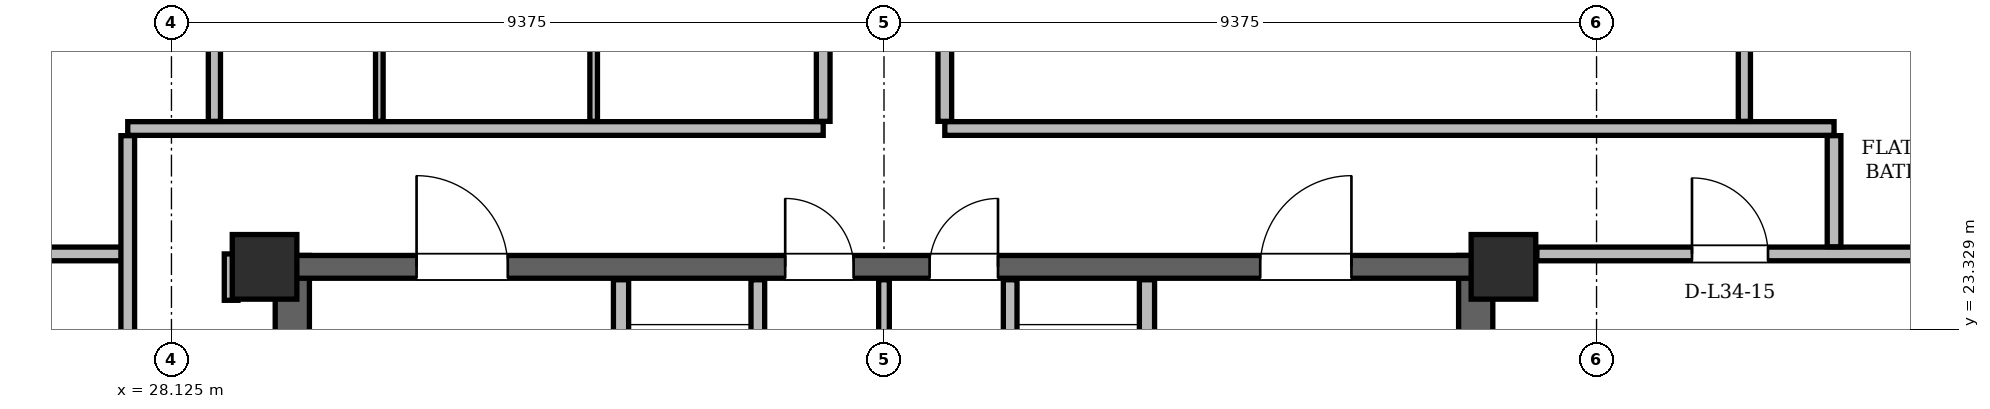
"""IFC4 building model, lengths in metres.
Left out: names, types, materials, properties, quantities, classifications, styles, units other than length and angle.
Written with IfcOpenShell. Run it as: python <this file> out.ifc"""

import sys

from ifc_helpers import new_model, si_unit, direction, frame, frame_2d, origin, origin_2d, place, context, subcontext, project, spatial, rectangle, hollow_rectangle, extrude, element, fill, save


model = new_model("IFC4")
c1 = context("Model", 3, precision=1e-05, world=origin(), true_north=direction((0.0, 1.0)))
c2 = subcontext(c1, "Body", "Model", "MODEL_VIEW")
j1 = project(units=[si_unit("LENGTHUNIT", "METRE"), si_unit("PLANEANGLEUNIT", "RADIAN")], contexts=[c1])
p1 = place(None, origin())
s1 = spatial("IfcSite", under=j1, at=p1, CompositionType="ELEMENT")
p2 = place(p1, origin())
s2 = spatial("IfcBuilding", under=s1, at=p2, CompositionType="ELEMENT")
p3 = place(p2, frame((0.0, 0.0, 130.2)))
s3 = spatial("IfcBuildingStorey", under=s2, at=p3, CompositionType="ELEMENT", Elevation=130.2)
for number, where, z_axis, x_axis in (
    (1, (45.65, 24.15, 0.0), (0.0, 0.0, 1.0), (1.0, 0.0, 0.0)),
    (2, (29.35, 24.15, 0.0), (0.0, 0.0, 1.0), (1.0, 0.0, 0.0)),
):
    element("IfcColumn", number, at=place(p3, frame(where, z_axis=z_axis, x_axis=x_axis)), inside=s3, PredefinedType="COLUMN", context=c2, shape_type="SweptSolid", body=[
        extrude(hollow_rectangle(XDim=0.85, YDim=0.85, WallThickness=0.07, at=origin_2d()), origin(), (0.0, 0.0, 1.0), 3.6),
    ])
for number, where, z_axis, x_axis in (
    (3, (29.715, 11.0, 0.0), (0.0, 0.0, 1.0), (0.0, 1.0, 0.0)),
    (4, (45.285, 11.0, 0.0), (0.0, 0.0, 1.0), (0.0, 1.0, 0.0)),
):
    element("IfcWall", number, at=place(p3, frame(where, z_axis=z_axis, x_axis=x_axis)), inside=s3, PredefinedType="SHEAR", context=c2, shape_type="SweptSolid", body=[
        extrude(rectangle(XDim=13.3, YDim=0.45, at=frame_2d((6.65, 0.0))), origin(), (0.0, 0.0, 1.0), 3.34),
    ])
p4 = place(p3, frame((29.65, 24.15, 0.0), z_axis=(0.0, 0.0, 1.0), x_axis=(1.0, 0.0, 0.0)))
e5 = element("IfcWall", 5, at=p4, inside=s3, PredefinedType="SHEAR", context=c2, shape_type="SweptSolid", body=[
    extrude(rectangle(XDim=15.7, YDim=0.3, at=frame_2d((7.85, 0.0))), origin(), (0.0, 0.0, 1.0), 3.34),
])
p5 = place(p4, frame((1.7, 0.0, 0.0)))
e6 = element("IfcOpeningElement", 6, at=p5, cuts=e5, PredefinedType="OPENING", context=c2, shape_type="SweptSolid", body=[
    extrude(rectangle(XDim=1.2, YDim=2.2, at=frame_2d((0.6, 1.1))), frame((0.0, 0.15, 0.0), z_axis=(0.0, -1.0, 0.0), x_axis=(1.0, 0.0, 0.0)), (0.0, 0.0, 1.0), 0.3),
])
p6 = place(p4, frame((12.8, 0.0, 0.0)))
e7 = element("IfcOpeningElement", 7, at=p6, cuts=e5, PredefinedType="OPENING", context=c2, shape_type="SweptSolid", body=[
    extrude(rectangle(XDim=1.2, YDim=2.2, at=frame_2d((0.6, 1.1))), frame((0.0, 0.15, 0.0), z_axis=(0.0, -1.0, 0.0), x_axis=(1.0, 0.0, 0.0)), (0.0, 0.0, 1.0), 0.3),
])
p7 = place(p4, frame((6.55, 0.0, 0.0)))
e8 = element("IfcOpeningElement", 8, at=p7, cuts=e5, PredefinedType="OPENING", context=c2, shape_type="SweptSolid", body=[
    extrude(rectangle(XDim=0.9, YDim=2.05, at=frame_2d((0.45, 1.025))), frame((0.0, 0.15, 0.0), z_axis=(0.0, -1.0, 0.0), x_axis=(1.0, 0.0, 0.0)), (0.0, 0.0, 1.0), 0.3),
])
p8 = place(p4, frame((8.45, 0.0, 0.0)))
e9 = element("IfcOpeningElement", 9, at=p8, cuts=e5, PredefinedType="OPENING", context=c2, shape_type="SweptSolid", body=[
    extrude(rectangle(XDim=0.9, YDim=2.05, at=frame_2d((0.45, 1.025))), frame((0.0, 0.15, 0.0), z_axis=(0.0, -1.0, 0.0), x_axis=(1.0, 0.0, 0.0)), (0.0, 0.0, 1.0), 0.3),
])
p9 = place(p3, frame((60.258, 12.962, 0.0), z_axis=(0.0, 0.0, 1.0), x_axis=(-0.499999044439, 0.866025955477, 0.0)))
e10 = element("IfcWall", 10, at=p9, inside=s3, PredefinedType="SOLIDWALL", context=c2, shape_type="SweptSolid", body=[
    extrude(rectangle(XDim=35.122, YDim=0.34, at=frame_2d((17.561, 0.0))), origin(), (0.0, 0.0, 1.0), 2.558),
])
p10 = place(p9, frame((8.034, 0.0, 0.0)))
e11 = element("IfcOpeningElement", 11, at=p10, cuts=e10, PredefinedType="OPENING", context=c2, shape_type="SweptSolid", body=[
    extrude(rectangle(XDim=1.5, YDim=2.2, at=frame_2d((0.75, 1.1))), frame((0.0, 0.17, 0.0), z_axis=(0.0, -1.0, 0.0), x_axis=(1.0, 0.0, 0.0)), (0.0, 0.0, 1.0), 0.34),
])
p11 = place(p9, frame((27.042, 0.0, 0.0)))
e12 = element("IfcOpeningElement", 12, at=p11, cuts=e10, PredefinedType="OPENING", context=c2, shape_type="SweptSolid", body=[
    extrude(rectangle(XDim=1.5, YDim=2.2, at=frame_2d((0.75, 1.1))), frame((0.0, 0.17, 0.0), z_axis=(0.0, -1.0, 0.0), x_axis=(1.0, 0.0, 0.0)), (0.0, 0.0, 1.0), 0.34),
])
p12 = place(p9, frame((3.327, 0.0, 0.85)))
e13 = element("IfcOpeningElement", 13, at=p12, cuts=e10, PredefinedType="OPENING", context=c2, shape_type="SweptSolid", body=[
    extrude(rectangle(XDim=1.2, YDim=1.48, at=frame_2d((0.6, 0.74))), frame((0.0, 0.17, 0.0), z_axis=(0.0, -1.0, 0.0), x_axis=(1.0, 0.0, 0.0)), (0.0, 0.0, 1.0), 0.34),
])
p13 = place(p9, frame((11.544, 0.0, 0.85)))
e14 = element("IfcOpeningElement", 14, at=p13, cuts=e10, PredefinedType="OPENING", context=c2, shape_type="SweptSolid", body=[
    extrude(rectangle(XDim=1.2, YDim=1.48, at=frame_2d((0.6, 0.74))), frame((0.0, 0.17, 0.0), z_axis=(0.0, -1.0, 0.0), x_axis=(1.0, 0.0, 0.0)), (0.0, 0.0, 1.0), 0.34),
])
p14 = place(p9, frame((31.202, 0.0, 0.85)))
e15 = element("IfcOpeningElement", 15, at=p14, cuts=e10, PredefinedType="OPENING", context=c2, shape_type="SweptSolid", body=[
    extrude(rectangle(XDim=2.2, YDim=1.598, at=frame_2d((1.1, 0.799))), frame((0.0, 0.17, 0.0), z_axis=(0.0, -1.0, 0.0), x_axis=(1.0, 0.0, 0.0)), (0.0, 0.0, 1.0), 0.34),
])
p15 = place(p9, frame((14.277, 0.0, 0.85)))
e16 = element("IfcOpeningElement", 16, at=p15, cuts=e10, PredefinedType="OPENING", context=c2, shape_type="SweptSolid", body=[
    extrude(rectangle(XDim=2.6, YDim=1.598, at=frame_2d((1.3, 0.799))), frame((0.0, 0.17, 0.0), z_axis=(0.0, -1.0, 0.0), x_axis=(1.0, 0.0, 0.0)), (0.0, 0.0, 1.0), 0.34),
])
p16 = place(p9, frame((19.025, 0.0, 0.85)))
e17 = element("IfcOpeningElement", 17, at=p16, cuts=e10, PredefinedType="OPENING", context=c2, shape_type="SweptSolid", body=[
    extrude(rectangle(XDim=2.0, YDim=1.598, at=frame_2d((1.0, 0.799))), frame((0.0, 0.17, 0.0), z_axis=(0.0, -1.0, 0.0), x_axis=(1.0, 0.0, 0.0)), (0.0, 0.0, 1.0), 0.34),
])
p17 = place(p3, frame((32.303, 43.378, 0.0), z_axis=(0.0, 0.0, 1.0), x_axis=(-0.499999044439, -0.866025955477, 0.0)))
e18 = element("IfcWall", 18, at=p17, inside=s3, PredefinedType="SOLIDWALL", context=c2, shape_type="SweptSolid", body=[
    extrude(rectangle(XDim=35.122, YDim=0.34, at=frame_2d((17.561, 0.0))), origin(), (0.0, 0.0, 1.0), 2.558),
])
p18 = place(p17, frame((8.034, 0.0, 0.0)))
e19 = element("IfcOpeningElement", 19, at=p18, cuts=e18, PredefinedType="OPENING", context=c2, shape_type="SweptSolid", body=[
    extrude(rectangle(XDim=1.5, YDim=2.2, at=frame_2d((0.75, 1.1))), frame((0.0, 0.17, 0.0), z_axis=(0.0, -1.0, 0.0), x_axis=(1.0, 0.0, 0.0)), (0.0, 0.0, 1.0), 0.34),
])
p19 = place(p17, frame((26.832, 0.0, 0.0)))
e20 = element("IfcOpeningElement", 20, at=p19, cuts=e18, PredefinedType="OPENING", context=c2, shape_type="SweptSolid", body=[
    extrude(rectangle(XDim=1.5, YDim=2.2, at=frame_2d((0.75, 1.1))), frame((0.0, 0.17, 0.0), z_axis=(0.0, -1.0, 0.0), x_axis=(1.0, 0.0, 0.0)), (0.0, 0.0, 1.0), 0.34),
])
p20 = place(p17, frame((32.666, 0.0, 0.85)))
e21 = element("IfcOpeningElement", 21, at=p20, cuts=e18, PredefinedType="OPENING", context=c2, shape_type="SweptSolid", body=[
    extrude(rectangle(XDim=1.4, YDim=1.598, at=frame_2d((0.7, 0.799))), frame((0.0, 0.17, 0.0), z_axis=(0.0, -1.0, 0.0), x_axis=(1.0, 0.0, 0.0)), (0.0, 0.0, 1.0), 0.34),
])
p21 = place(p17, frame((22.593, 0.0, 0.85)))
e22 = element("IfcOpeningElement", 22, at=p21, cuts=e18, PredefinedType="OPENING", context=c2, shape_type="SweptSolid", body=[
    extrude(rectangle(XDim=1.2, YDim=1.48, at=frame_2d((0.6, 0.74))), frame((0.0, 0.17, 0.0), z_axis=(0.0, -1.0, 0.0), x_axis=(1.0, 0.0, 0.0)), (0.0, 0.0, 1.0), 0.34),
])
p22 = place(p17, frame((2.413, 0.0, 0.85)))
e23 = element("IfcOpeningElement", 23, at=p22, cuts=e18, PredefinedType="OPENING", context=c2, shape_type="SweptSolid", body=[
    extrude(rectangle(XDim=1.4, YDim=1.598, at=frame_2d((0.7, 0.799))), frame((0.0, 0.17, 0.0), z_axis=(0.0, -1.0, 0.0), x_axis=(1.0, 0.0, 0.0)), (0.0, 0.0, 1.0), 0.34),
])
p23 = place(p17, frame((13.476, 0.0, 0.85)))
e24 = element("IfcOpeningElement", 24, at=p23, cuts=e18, PredefinedType="OPENING", context=c2, shape_type="SweptSolid", body=[
    extrude(rectangle(XDim=2.5, YDim=1.598, at=frame_2d((1.25, 0.799))), frame((0.0, 0.17, 0.0), z_axis=(0.0, -1.0, 0.0), x_axis=(1.0, 0.0, 0.0)), (0.0, 0.0, 1.0), 0.34),
])
p24 = place(p17, frame((18.259, 0.0, 0.85)))
e25 = element("IfcOpeningElement", 25, at=p24, cuts=e18, PredefinedType="OPENING", context=c2, shape_type="SweptSolid", body=[
    extrude(rectangle(XDim=1.2, YDim=1.48, at=frame_2d((0.6, 0.74))), frame((0.0, 0.17, 0.0), z_axis=(0.0, -1.0, 0.0), x_axis=(1.0, 0.0, 0.0)), (0.0, 0.0, 1.0), 0.34),
])
p25 = place(p17, frame((20.455, 0.0, 0.85)))
e26 = element("IfcOpeningElement", 26, at=p25, cuts=e18, PredefinedType="OPENING", context=c2, shape_type="SweptSolid", body=[
    extrude(rectangle(XDim=1.2, YDim=1.48, at=frame_2d((0.6, 0.74))), frame((0.0, 0.17, 0.0), z_axis=(0.0, -1.0, 0.0), x_axis=(1.0, 0.0, 0.0)), (0.0, 0.0, 1.0), 0.34),
])
p26 = place(p3, frame((34.04, 19.48, 0.0), z_axis=(0.0, 0.0, 1.0), x_axis=(0.0, 1.0, 0.0)))
e27 = element("IfcWall", 27, at=p26, inside=s3, PredefinedType="PARTITIONING", context=c2, shape_type="SweptSolid", body=[
    extrude(rectangle(XDim=4.5, YDim=0.2, at=frame_2d((2.25, 0.0))), origin(), (0.0, 0.0, 1.0), 2.38),
])
p27 = place(p26, frame((2.12, 0.0, 0.0)))
e28 = element("IfcOpeningElement", 28, at=p27, cuts=e27, PredefinedType="OPENING", context=c2, shape_type="SweptSolid", body=[
    extrude(rectangle(XDim=1.1, YDim=2.2, at=frame_2d((0.55, 1.1))), frame((0.0, 0.1, 0.0), z_axis=(0.0, -1.0, 0.0), x_axis=(1.0, 0.0, 0.0)), (0.0, 0.0, 1.0), 0.2),
])
p28 = place(p3, frame((35.84, 20.96, 0.0), z_axis=(0.0, 0.0, 1.0), x_axis=(0.0, 1.0, 0.0)))
e29 = element("IfcWall", 29, at=p28, inside=s3, PredefinedType="PARTITIONING", context=c2, shape_type="SweptSolid", body=[
    extrude(rectangle(XDim=3.02, YDim=0.18, at=frame_2d((1.51, 0.0))), origin(), (0.0, 0.0, 1.0), 2.38),
])
p29 = place(p3, frame((40.96, 19.48, 0.0), z_axis=(0.0, 0.0, 1.0), x_axis=(0.0, 1.0, 0.0)))
e30 = element("IfcWall", 30, at=p29, inside=s3, PredefinedType="PARTITIONING", context=c2, shape_type="SweptSolid", body=[
    extrude(rectangle(XDim=4.5, YDim=0.2, at=frame_2d((2.25, 0.0))), origin(), (0.0, 0.0, 1.0), 2.38),
])
p30 = place(p29, frame((2.12, 0.0, 0.0)))
e31 = element("IfcOpeningElement", 31, at=p30, cuts=e30, PredefinedType="OPENING", context=c2, shape_type="SweptSolid", body=[
    extrude(rectangle(XDim=1.1, YDim=2.2, at=frame_2d((0.55, 1.1))), frame((0.0, 0.1, 0.0), z_axis=(0.0, -1.0, 0.0), x_axis=(1.0, 0.0, 0.0)), (0.0, 0.0, 1.0), 0.2),
])
p31 = place(p3, frame((39.16, 20.96, 0.0), z_axis=(0.0, 0.0, 1.0), x_axis=(0.0, 1.0, 0.0)))
e32 = element("IfcWall", 32, at=p31, inside=s3, PredefinedType="PARTITIONING", context=c2, shape_type="SweptSolid", body=[
    extrude(rectangle(XDim=3.02, YDim=0.18, at=frame_2d((1.51, 0.0))), origin(), (0.0, 0.0, 1.0), 2.38),
])
p32 = place(p3, frame((37.5, 21.06, 0.0), z_axis=(0.0, 0.0, 1.0), x_axis=(0.0, 1.0, 0.0)))
e33 = element("IfcWall", 33, at=p32, inside=s3, PredefinedType="PARTITIONING", context=c2, shape_type="SweptSolid", body=[
    extrude(rectangle(XDim=2.92, YDim=0.14, at=frame_2d((1.46, 0.0))), origin(), (0.0, 0.0, 1.0), 2.38),
])
p33 = place(p3, frame((21.5, 24.32, 0.0), z_axis=(0.0, 0.0, 1.0), x_axis=(1.0, 0.0, 0.0)))
e34 = element("IfcWall", 34, at=p33, inside=s3, PredefinedType="PARTITIONING", context=c2, shape_type="SweptSolid", body=[
    extrude(rectangle(XDim=6.11, YDim=0.18, at=frame_2d((3.055, 0.0))), origin(), (0.0, 0.0, 1.0), 3.34),
])
p34 = place(p3, frame((46.09, 24.32, 0.0), z_axis=(0.0, 0.0, 1.0), x_axis=(1.0, 0.0, 0.0)))
e35 = element("IfcWall", 35, at=p34, inside=s3, PredefinedType="PARTITIONING", context=c2, shape_type="SweptSolid", body=[
    extrude(rectangle(XDim=7.409, YDim=0.18, at=frame_2d((3.705, 0.0))), origin(), (0.0, 0.0, 1.0), 3.34),
])
p35 = place(p34, frame((2.041, 0.0, 0.0)))
e36 = element("IfcOpeningElement", 36, at=p35, cuts=e35, PredefinedType="OPENING", context=c2, shape_type="SweptSolid", body=[
    extrude(rectangle(XDim=1.0, YDim=2.18, at=frame_2d((0.5, 1.09))), frame((0.0, 0.09, 0.0), z_axis=(0.0, -1.0, 0.0), x_axis=(1.0, 0.0, 0.0)), (0.0, 0.0, 1.0), 0.18),
])
p36 = place(p3, frame((27.55, 25.97, 0.0), z_axis=(0.0, 0.0, 1.0), x_axis=(1.0, 0.0, 0.0)))
e37 = element("IfcWall", 37, at=p36, inside=s3, PredefinedType="PARTITIONING", context=c2, shape_type="SweptSolid", body=[
    extrude(rectangle(XDim=9.15, YDim=0.18, at=frame_2d((4.575, 0.0))), origin(), (0.0, 0.0, 1.0), 2.794),
])
p37 = place(p3, frame((38.3, 25.97, 0.0), z_axis=(0.0, 0.0, 1.0), x_axis=(1.0, 0.0, 0.0)))
e38 = element("IfcWall", 38, at=p37, inside=s3, PredefinedType="PARTITIONING", context=c2, shape_type="SweptSolid", body=[
    extrude(rectangle(XDim=11.7, YDim=0.18, at=frame_2d((5.85, 0.0))), origin(), (0.0, 0.0, 1.0), 2.794),
])
p38 = place(p3, frame((27.55, 18.544, 0.0), z_axis=(0.0, 0.0, 1.0), x_axis=(0.0, 1.0, 0.0)))
e39 = element("IfcWall", 39, at=p38, inside=s3, PredefinedType="PARTITIONING", context=c2, shape_type="SweptSolid", body=[
    extrude(rectangle(XDim=7.332, YDim=0.18, at=frame_2d((3.666, 0.0))), origin(), (0.0, 0.0, 1.0), 3.34),
])
p39 = place(p3, frame((28.69, 26.064, 0.0), z_axis=(0.0, 0.0, 1.0), x_axis=(0.0, 1.0, 0.0)))
e40 = element("IfcWall", 40, at=p39, inside=s3, PredefinedType="PARTITIONING", context=c2, shape_type="SweptSolid", body=[
    extrude(rectangle(XDim=1.542, YDim=0.16, at=frame_2d((0.771, 0.0))), origin(), (0.0, 0.0, 1.0), 3.34),
])
p40 = place(p3, frame((28.91, 23.71, 0.0), z_axis=(0.0, 0.0, 1.0), x_axis=(0.0, 1.0, 0.0)))
e41 = element("IfcWall", 41, at=p40, inside=s3, PredefinedType="PARTITIONING", context=c2, shape_type="SweptSolid", body=[
    extrude(rectangle(XDim=0.61, YDim=0.18, at=frame_2d((0.305, 0.0))), origin(), (0.0, 0.0, 1.0), 3.34),
])
for number, where, z_axis, x_axis in (
    (42, (30.86, 26.064, 0.0), (0.0, 0.0, 1.0), (0.0, 1.0, 0.0)),
    (43, (33.68, 26.064, 0.0), (0.0, 0.0, 1.0), (0.0, 1.0, 0.0)),
):
    element("IfcWall", number, at=place(p3, frame(where, z_axis=z_axis, x_axis=x_axis)), inside=s3, PredefinedType="PARTITIONING", context=c2, shape_type="SweptSolid", body=[
        extrude(rectangle(XDim=1.542, YDim=0.1, at=frame_2d((0.771, 0.0))), origin(), (0.0, 0.0, 1.0), 3.34),
    ])
p41 = place(p3, frame((36.7, 26.064, 0.0), z_axis=(0.0, 0.0, 1.0), x_axis=(0.0, 1.0, 0.0)))
e44 = element("IfcWall", 44, at=p41, inside=s3, PredefinedType="PARTITIONING", context=c2, shape_type="SweptSolid", body=[
    extrude(rectangle(XDim=17.14, YDim=0.18, at=frame_2d((8.57, 0.0))), origin(), (0.0, 0.0, 1.0), 3.34),
])
p42 = place(p41, frame((7.06, 0.0, 0.0)))
e45 = element("IfcOpeningElement", 45, at=p42, cuts=e44, PredefinedType="OPENING", context=c2, shape_type="SweptSolid", body=[
    extrude(rectangle(XDim=1.0, YDim=2.18, at=frame_2d((0.5, 1.09))), frame((0.0, 0.09, 0.0), z_axis=(0.0, -1.0, 0.0), x_axis=(1.0, 0.0, 0.0)), (0.0, 0.0, 1.0), 0.18),
])
p43 = place(p3, frame((38.3, 26.064, 0.0), z_axis=(0.0, 0.0, 1.0), x_axis=(0.0, 1.0, 0.0)))
e46 = element("IfcWall", 46, at=p43, inside=s3, PredefinedType="PARTITIONING", context=c2, shape_type="SweptSolid", body=[
    extrude(rectangle(XDim=13.442, YDim=0.18, at=frame_2d((6.721, 0.0))), origin(), (0.0, 0.0, 1.0), 3.34),
])
p44 = place(p43, frame((6.146, 0.0, 0.0)))
e47 = element("IfcOpeningElement", 47, at=p44, cuts=e46, PredefinedType="OPENING", context=c2, shape_type="SweptSolid", body=[
    extrude(rectangle(XDim=1.0, YDim=2.18, at=frame_2d((0.5, 1.09))), frame((0.0, 0.09, 0.0), z_axis=(0.0, -1.0, 0.0), x_axis=(1.0, 0.0, 0.0)), (0.0, 0.0, 1.0), 0.18),
])
p45 = place(p3, frame((48.82, 26.064, 0.0), z_axis=(0.0, 0.0, 1.0), x_axis=(0.0, 1.0, 0.0)))
e48 = element("IfcWall", 48, at=p45, inside=s3, PredefinedType="PARTITIONING", context=c2, shape_type="SweptSolid", body=[
    extrude(rectangle(XDim=6.361, YDim=0.16, at=frame_2d((3.181, 0.0))), origin(), (0.0, 0.0, 1.0), 2.558),
])
p46 = place(p45, frame((2.724, 0.0, 0.0)))
e49 = element("IfcOpeningElement", 49, at=p46, cuts=e48, PredefinedType="OPENING", context=c2, shape_type="SweptSolid", body=[
    extrude(rectangle(XDim=0.88, YDim=2.08, at=frame_2d((0.44, 1.04))), frame((0.0, 0.08, 0.0), z_axis=(0.0, -1.0, 0.0), x_axis=(1.0, 0.0, 0.0)), (0.0, 0.0, 1.0), 0.16),
])
p47 = place(p3, frame((50.0, 24.414, 0.0), z_axis=(0.0, 0.0, 1.0), x_axis=(0.0, 1.0, 0.0)))
e50 = element("IfcWall", 50, at=p47, inside=s3, PredefinedType="PARTITIONING", context=c2, shape_type="SweptSolid", body=[
    extrude(rectangle(XDim=1.462, YDim=0.18, at=frame_2d((0.731, 0.0))), origin(), (0.0, 0.0, 1.0), 3.34),
])
p48 = place(p5, origin())
e51 = element("IfcDoor", 51, at=p48, inside=s3, OperationType="SINGLE_SWING_LEFT", PredefinedType="DOOR", context=c2, shape_type="SweptSolid", body=[
    extrude(rectangle(XDim=1.2, YDim=2.2, at=frame_2d((0.6, 1.1))), frame((0.0, 0.025, 0.0), z_axis=(0.0, -1.0, 0.0), x_axis=(1.0, 0.0, 0.0)), (0.0, 0.0, 1.0), 0.05),
])
fill(e6, e51)
p49 = place(p6, origin())
e52 = element("IfcDoor", 52, at=p49, inside=s3, OperationType="SINGLE_SWING_RIGHT", PredefinedType="DOOR", context=c2, shape_type="SweptSolid", body=[
    extrude(rectangle(XDim=1.2, YDim=2.2, at=frame_2d((0.6, 1.1))), frame((0.0, 0.025, 0.0), z_axis=(0.0, -1.0, 0.0), x_axis=(1.0, 0.0, 0.0)), (0.0, 0.0, 1.0), 0.05),
])
fill(e7, e52)
p50 = place(p7, origin())
e53 = element("IfcDoor", 53, at=p50, inside=s3, OperationType="SINGLE_SWING_LEFT", PredefinedType="DOOR", context=c2, shape_type="SweptSolid", body=[
    extrude(rectangle(XDim=0.9, YDim=2.05, at=frame_2d((0.45, 1.025))), frame((0.0, 0.025, 0.0), z_axis=(0.0, -1.0, 0.0), x_axis=(1.0, 0.0, 0.0)), (0.0, 0.0, 1.0), 0.05),
])
fill(e8, e53)
p51 = place(p8, origin())
e54 = element("IfcDoor", 54, at=p51, inside=s3, OperationType="SINGLE_SWING_RIGHT", PredefinedType="DOOR", context=c2, shape_type="SweptSolid", body=[
    extrude(rectangle(XDim=0.9, YDim=2.05, at=frame_2d((0.45, 1.025))), frame((0.0, 0.025, 0.0), z_axis=(0.0, -1.0, 0.0), x_axis=(1.0, 0.0, 0.0)), (0.0, 0.0, 1.0), 0.05),
])
fill(e9, e54)
p52 = place(p35, origin())
e55 = element("IfcDoor", 55, at=p52, inside=s3, OperationType="SINGLE_SWING_LEFT", PredefinedType="DOOR", context=c2, shape_type="SweptSolid", body=[
    extrude(rectangle(XDim=1.0, YDim=2.18, at=frame_2d((0.5, 1.09))), frame((0.0, 0.025, 0.0), z_axis=(0.0, -1.0, 0.0), x_axis=(1.0, 0.0, 0.0)), (0.0, 0.0, 1.0), 0.05),
])
fill(e36, e55)
save(model, sys.argv[1])
